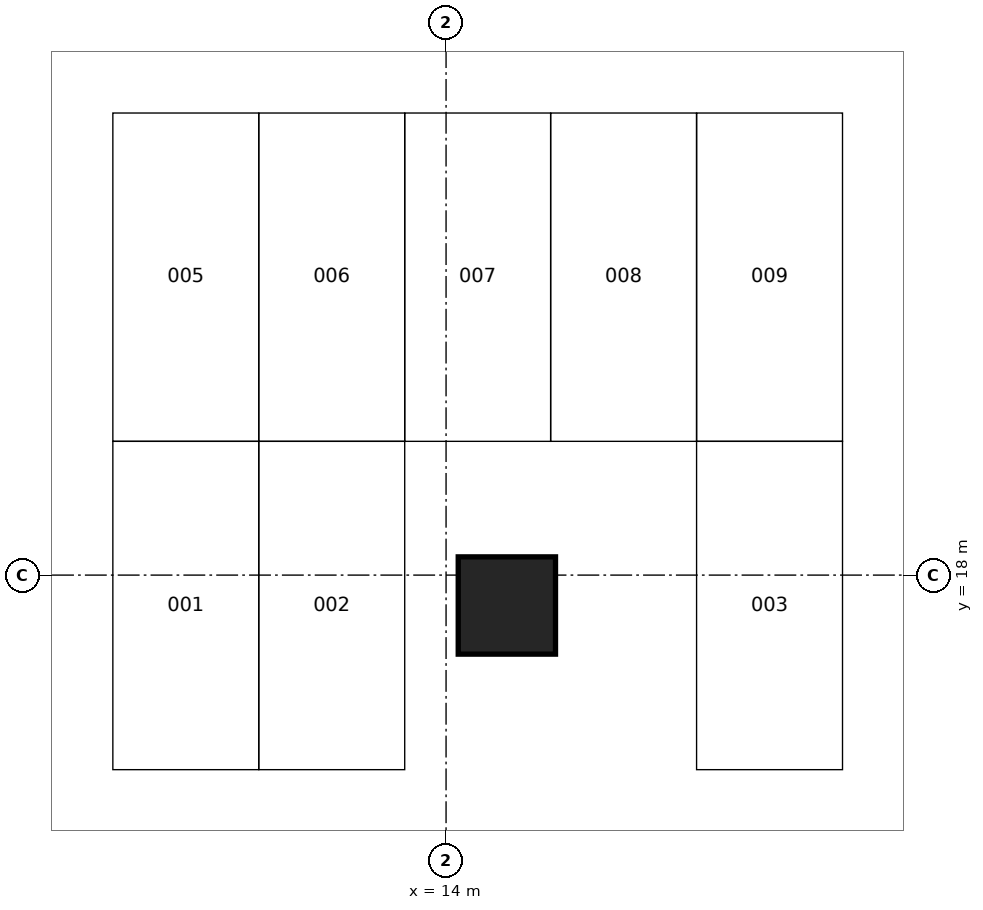
"""IFC4 building model, lengths in metres.
Left out: names, types, materials, properties, quantities, classifications, styles, units other than length and angle.
Written with IfcOpenShell. Run it as: python <this file> out.ifc"""

import sys

from ifc_helpers import new_model, si_unit, direction, frame, origin, origin_2d, place, context, subcontext, project, spatial, rectangle, extrude, element, save


model = new_model("IFC4")
c1 = context("Model", 3, precision=1e-05, world=origin(), true_north=direction((0.0, 1.0)))
c2 = subcontext(c1, "Body", "Model", "MODEL_VIEW")
j1 = project(units=[si_unit("LENGTHUNIT", "METRE"), si_unit("PLANEANGLEUNIT", "RADIAN")], contexts=[c1])
p1 = place(None, origin())
s1 = spatial("IfcSite", under=j1, at=p1, CompositionType="ELEMENT")
p2 = place(p1, origin())
s2 = spatial("IfcBuilding", under=s1, at=p2, CompositionType="ELEMENT")
p3 = place(p2, frame((0.0, 0.0, -7.4)))
s3 = spatial("IfcBuildingStorey", under=s2, at=p3, CompositionType="ELEMENT", Elevation=-7.4)
p4 = place(p3, frame((15.0, 17.5, -0.4), z_axis=(0.0, 0.0, 1.0), x_axis=(1.0, 0.0, 0.0)))
e1 = element("IfcColumn", 1, at=p4, inside=s3, PredefinedType="COLUMN", context=c2, shape_type="SweptSolid", body=[
    extrude(rectangle(XDim=1.6, YDim=1.6, at=origin_2d()), origin(), (0.0, 0.0, 1.0), 4.1),
])
save(model, sys.argv[1])
